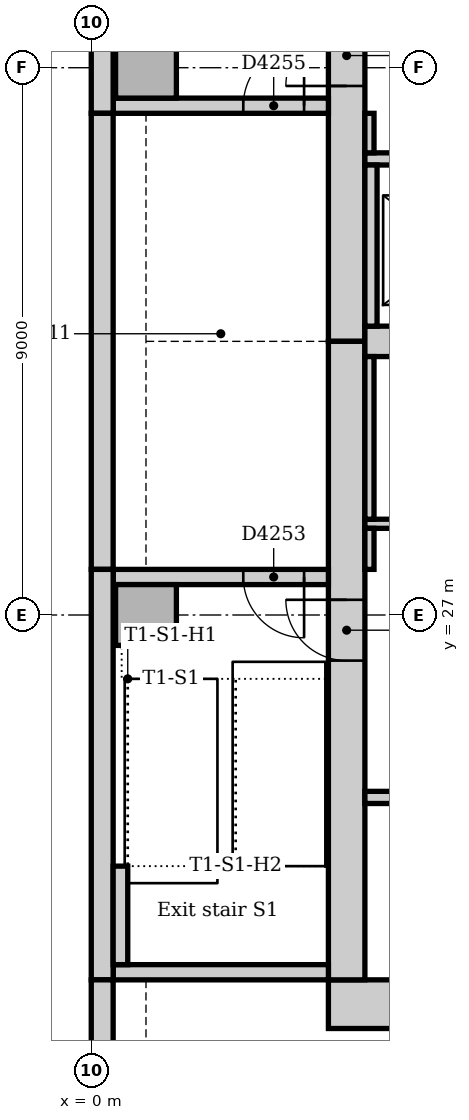
"""IFC4 building model, lengths in metres.
Left out: names, types, materials, properties, quantities, classifications, styles, units other than length and angle.
Written with IfcOpenShell. Run it as: python <this file> out.ifc"""

import sys

from ifc_helpers import new_model, si_unit, direction, frame, frame_2d, origin, origin_2d, place, context, subcontext, project, spatial, rectangle, extrude, element, fill, save


model = new_model("IFC4")
c1 = context("Model", 3, precision=1e-05, world=origin(), true_north=direction((0.0, 1.0)))
c2 = subcontext(c1, "Body", "Model", "MODEL_VIEW")
j1 = project(units=[si_unit("LENGTHUNIT", "METRE"), si_unit("PLANEANGLEUNIT", "RADIAN")], contexts=[c1])
p1 = place(None, origin())
s1 = spatial("IfcSite", under=j1, at=p1, CompositionType="ELEMENT")
p2 = place(p1, origin())
s2 = spatial("IfcBuilding", under=s1, at=p2, CompositionType="ELEMENT")
p3 = place(p2, frame((0.0, 0.0, 132.0)))
s3 = spatial("IfcBuildingStorey", under=s2, at=p3, CompositionType="ELEMENT", Elevation=132.0)
p4 = place(p3, frame((3.9, 20.6, 0.0), z_axis=(0.0, 0.0, 1.0), x_axis=(1.0, 0.0, 0.0)))
e1 = element("IfcWall", 1, at=p4, inside=s3, PredefinedType="SOLIDWALL", context=c2, shape_type="SweptSolid", body=[
    extrude(rectangle(XDim=19.4, YDim=0.8, at=frame_2d((9.7, 0.0))), origin(), (0.0, 0.0, 1.0), 4.0),
])
p5 = place(p3, frame((4.2, 42.0, 0.0), z_axis=(0.0, 0.0, 1.0), x_axis=(0.0, -1.0, 0.0)))
e2 = element("IfcWall", 2, at=p5, inside=s3, PredefinedType="SOLIDWALL", context=c2, shape_type="SweptSolid", body=[
    extrude(rectangle(XDim=10.5, YDim=0.6, at=frame_2d((5.25, 0.0))), origin(), (0.0, 0.0, 1.0), 4.0),
])
p6 = place(p5, frame((5.3, 0.0, 0.0)))
e3 = element("IfcOpeningElement", 3, at=p6, cuts=e2, PredefinedType="OPENING", context=c2, shape_type="SweptSolid", body=[
    extrude(rectangle(XDim=1.0, YDim=2.1, at=frame_2d((0.5, 1.05))), frame((0.0, 0.31, 0.0), z_axis=(0.0, -1.0, 0.0), x_axis=(1.0, 0.0, 0.0)), (0.0, 0.0, 1.0), 0.62),
])
p7 = place(p3, frame((4.2, 31.5, 0.0), z_axis=(0.0, 0.0, 1.0), x_axis=(0.0, -1.0, 0.0)))
e4 = element("IfcWall", 4, at=p7, inside=s3, PredefinedType="SOLIDWALL", context=c2, shape_type="SweptSolid", body=[
    extrude(rectangle(XDim=10.5, YDim=0.6, at=frame_2d((5.25, 0.0))), origin(), (0.0, 0.0, 1.0), 4.0),
])
p8 = place(p7, frame((4.25, 0.0, 0.0)))
e5 = element("IfcOpeningElement", 5, at=p8, cuts=e4, PredefinedType="OPENING", context=c2, shape_type="SweptSolid", body=[
    extrude(rectangle(XDim=1.0, YDim=2.1, at=frame_2d((0.5, 1.05))), frame((0.0, 0.31, 0.0), z_axis=(0.0, -1.0, 0.0), x_axis=(1.0, 0.0, 0.0)), (0.0, 0.0, 1.0), 0.62),
])
p9 = place(p3, frame((4.5, 31.5, 0.0), z_axis=(0.0, 0.0, 1.0), x_axis=(1.0, 0.0, 0.0)))
e6 = element("IfcWall", 6, at=p9, inside=s3, PredefinedType="SOLIDWALL", context=c2, shape_type="SweptSolid", body=[
    extrude(rectangle(XDim=18.0, YDim=0.5, at=frame_2d((9.0, 0.0))), origin(), (0.0, 0.0, 1.0), 4.0),
])
p10 = place(p3, frame((0.36, 21.125, 0.0), z_axis=(0.0, 0.0, 1.0), x_axis=(1.0, 0.0, 0.0)))
e7 = element("IfcWall", 7, at=p10, inside=s3, PredefinedType="SOLIDWALL", context=c2, shape_type="SweptSolid", body=[
    extrude(rectangle(XDim=3.54, YDim=0.25, at=frame_2d((1.77, 0.0))), origin(), (0.0, 0.0, 1.0), 4.0),
])
p11 = place(p3, frame((3.9, 27.625, 0.0), z_axis=(0.0, 0.0, 1.0), x_axis=(-1.0, 0.0, 0.0)))
e8 = element("IfcWall", 8, at=p11, inside=s3, PredefinedType="SOLIDWALL", context=c2, shape_type="SweptSolid", body=[
    extrude(rectangle(XDim=3.54, YDim=0.25, at=frame_2d((1.77, 0.0))), origin(), (0.0, 0.0, 1.0), 4.0),
])
p12 = place(p11, frame((0.4, 0.0, 0.0)))
e9 = element("IfcOpeningElement", 9, at=p12, cuts=e8, PredefinedType="OPENING", context=c2, shape_type="SweptSolid", body=[
    extrude(rectangle(XDim=1.0, YDim=2.1, at=frame_2d((0.5, 1.05))), frame((0.0, 0.135, 0.0), z_axis=(0.0, -1.0, 0.0), x_axis=(1.0, 0.0, 0.0)), (0.0, 0.0, 1.0), 0.27),
])
p13 = place(p3, frame((0.36, 35.375, 0.0), z_axis=(0.0, 0.0, 1.0), x_axis=(1.0, 0.0, 0.0)))
e10 = element("IfcWall", 10, at=p13, inside=s3, PredefinedType="SOLIDWALL", context=c2, shape_type="SweptSolid", body=[
    extrude(rectangle(XDim=3.54, YDim=0.25, at=frame_2d((1.77, 0.0))), origin(), (0.0, 0.0, 1.0), 4.0),
])
p14 = place(p13, frame((2.14, 0.0, 0.0)))
e11 = element("IfcOpeningElement", 11, at=p14, cuts=e10, PredefinedType="OPENING", context=c2, shape_type="SweptSolid", body=[
    extrude(rectangle(XDim=1.0, YDim=2.1, at=frame_2d((0.5, 1.05))), frame((0.0, 0.135, 0.0), z_axis=(0.0, -1.0, 0.0), x_axis=(1.0, 0.0, 0.0)), (0.0, 0.0, 1.0), 0.27),
])
for number, where, z_axis, x_axis in (
    (12, (0.9, 27.0, 0.0), (0.0, 0.0, 1.0), (1.0, 0.0, 0.0)),
    (13, (0.9, 36.0, 0.0), (0.0, 0.0, 1.0), (1.0, 0.0, 0.0)),
):
    element("IfcColumn", number, at=place(p3, frame(where, z_axis=z_axis, x_axis=x_axis)), inside=s3, PredefinedType="COLUMN", context=c2, shape_type="SweptSolid", body=[
        extrude(rectangle(XDim=1.0, YDim=1.0, at=origin_2d()), origin(), (0.0, 0.0, 1.0), 4.0),
    ])
p15 = place(p3, frame((0.18, 42.0, 0.0), z_axis=(0.0, 0.0, 1.0), x_axis=(0.0, -1.0, 0.0)))
e14 = element("IfcWall", 14, at=p15, inside=s3, PredefinedType="STANDARD", context=c2, shape_type="SweptSolid", body=[
    extrude(rectangle(XDim=6.75, YDim=0.36, at=frame_2d((3.375, 0.0))), origin(), (0.0, 0.0, 1.0), 3.85),
])
p16 = place(p3, frame((0.18, 35.25, 0.0), z_axis=(0.0, 0.0, 1.0), x_axis=(0.0, -1.0, 0.0)))
e15 = element("IfcWall", 15, at=p16, inside=s3, PredefinedType="STANDARD", context=c2, shape_type="SweptSolid", body=[
    extrude(rectangle(XDim=7.5, YDim=0.36, at=frame_2d((3.75, 0.0))), origin(), (0.0, 0.0, 1.0), 3.85),
])
p17 = place(p3, frame((0.18, 27.75, 0.0), z_axis=(0.0, 0.0, 1.0), x_axis=(0.0, -1.0, 0.0)))
e16 = element("IfcWall", 16, at=p17, inside=s3, PredefinedType="STANDARD", context=c2, shape_type="SweptSolid", body=[
    extrude(rectangle(XDim=6.75, YDim=0.36, at=frame_2d((3.375, 0.0))), origin(), (0.0, 0.0, 1.0), 3.85),
])
p18 = place(p3, frame((0.18, 21.0, 0.0), z_axis=(0.0, 0.0, 1.0), x_axis=(0.0, -1.0, 0.0)))
e17 = element("IfcWall", 17, at=p18, inside=s3, PredefinedType="STANDARD", context=c2, shape_type="SweptSolid", body=[
    extrude(rectangle(XDim=12.257, YDim=0.36, at=frame_2d((6.129, 0.0))), origin(), (0.0, 0.0, 1.0), 3.85),
])
p19 = place(p18, frame((1.35, 0.0, 0.9)))
e18 = element("IfcOpeningElement", 18, at=p19, cuts=e17, PredefinedType="OPENING", context=c2, shape_type="SweptSolid", body=[
    extrude(rectangle(XDim=3.3, YDim=1.6, at=frame_2d((1.65, 0.8))), frame((0.0, 0.19, 0.0), z_axis=(0.0, -1.0, 0.0), x_axis=(1.0, 0.0, 0.0)), (0.0, 0.0, 1.0), 0.38),
])
p20 = place(p18, frame((5.85, 0.0, 0.9)))
e19 = element("IfcOpeningElement", 19, at=p20, cuts=e17, PredefinedType="OPENING", context=c2, shape_type="SweptSolid", body=[
    extrude(rectangle(XDim=3.3, YDim=1.6, at=frame_2d((1.65, 0.8))), frame((0.0, 0.19, 0.0), z_axis=(0.0, -1.0, 0.0), x_axis=(1.0, 0.0, 0.0)), (0.0, 0.0, 1.0), 0.38),
])
p21 = place(p3, frame((0.48, 21.25, 0.0), z_axis=(0.0, 0.0, 1.0), x_axis=(0.0, 1.0, 0.0)))
e20 = element("IfcWall", 20, at=p21, inside=s3, PredefinedType="STANDARD", context=c2, shape_type="SweptSolid", body=[
    extrude(rectangle(XDim=1.62, YDim=0.24, at=frame_2d((0.81, 0.0))), origin(), (0.0, 0.0, 1.0), 4.0),
])
p22 = place(p3, frame((4.5, 24.0, 0.0), z_axis=(0.0, 0.0, 1.0), x_axis=(1.0, 0.0, 0.0)))
e21 = element("IfcWall", 21, at=p22, inside=s3, PredefinedType="PARTITIONING", context=c2, shape_type="SweptSolid", body=[
    extrude(rectangle(XDim=18.0, YDim=0.2, at=frame_2d((9.0, 0.0))), origin(), (0.0, 0.0, 1.0), 3.85),
])
p23 = place(p22, frame((0.95, 0.0, 0.0)))
e22 = element("IfcOpeningElement", 22, at=p23, cuts=e21, PredefinedType="OPENING", context=c2, shape_type="SweptSolid", body=[
    extrude(rectangle(XDim=1.1, YDim=2.1, at=frame_2d((0.55, 1.05))), frame((0.0, 0.11, 0.0), z_axis=(0.0, -1.0, 0.0), x_axis=(1.0, 0.0, 0.0)), (0.0, 0.0, 1.0), 0.22),
])
p24 = place(p22, frame((3.95, 0.0, 0.0)))
e23 = element("IfcOpeningElement", 23, at=p24, cuts=e21, PredefinedType="OPENING", context=c2, shape_type="SweptSolid", body=[
    extrude(rectangle(XDim=1.1, YDim=2.1, at=frame_2d((0.55, 1.05))), frame((0.0, 0.11, 0.0), z_axis=(0.0, -1.0, 0.0), x_axis=(1.0, 0.0, 0.0)), (0.0, 0.0, 1.0), 0.22),
])
p25 = place(p22, frame((6.95, 0.0, 0.0)))
e24 = element("IfcOpeningElement", 24, at=p25, cuts=e21, PredefinedType="OPENING", context=c2, shape_type="SweptSolid", body=[
    extrude(rectangle(XDim=1.1, YDim=2.1, at=frame_2d((0.55, 1.05))), frame((0.0, 0.11, 0.0), z_axis=(0.0, -1.0, 0.0), x_axis=(1.0, 0.0, 0.0)), (0.0, 0.0, 1.0), 0.22),
])
p26 = place(p22, frame((9.95, 0.0, 0.0)))
e25 = element("IfcOpeningElement", 25, at=p26, cuts=e21, PredefinedType="OPENING", context=c2, shape_type="SweptSolid", body=[
    extrude(rectangle(XDim=1.1, YDim=2.1, at=frame_2d((0.55, 1.05))), frame((0.0, 0.11, 0.0), z_axis=(0.0, -1.0, 0.0), x_axis=(1.0, 0.0, 0.0)), (0.0, 0.0, 1.0), 0.22),
])
p27 = place(p22, frame((12.95, 0.0, 0.0)))
e26 = element("IfcOpeningElement", 26, at=p27, cuts=e21, PredefinedType="OPENING", context=c2, shape_type="SweptSolid", body=[
    extrude(rectangle(XDim=1.1, YDim=2.1, at=frame_2d((0.55, 1.05))), frame((0.0, 0.11, 0.0), z_axis=(0.0, -1.0, 0.0), x_axis=(1.0, 0.0, 0.0)), (0.0, 0.0, 1.0), 0.22),
])
p28 = place(p22, frame((15.95, 0.0, 0.0)))
e27 = element("IfcOpeningElement", 27, at=p28, cuts=e21, PredefinedType="OPENING", context=c2, shape_type="SweptSolid", body=[
    extrude(rectangle(XDim=1.1, YDim=2.1, at=frame_2d((0.55, 1.05))), frame((0.0, 0.11, 0.0), z_axis=(0.0, -1.0, 0.0), x_axis=(1.0, 0.0, 0.0)), (0.0, 0.0, 1.0), 0.22),
])
p29 = place(p3, frame((4.5, 34.5, 0.0), z_axis=(0.0, 0.0, 1.0), x_axis=(1.0, 0.0, 0.0)))
e28 = element("IfcWall", 28, at=p29, inside=s3, PredefinedType="PARTITIONING", context=c2, shape_type="SweptSolid", body=[
    extrude(rectangle(XDim=18.0, YDim=0.2, at=frame_2d((9.0, 0.0))), origin(), (0.0, 0.0, 1.0), 3.85),
])
p30 = place(p29, frame((0.95, 0.0, 0.0)))
e29 = element("IfcOpeningElement", 29, at=p30, cuts=e28, PredefinedType="OPENING", context=c2, shape_type="SweptSolid", body=[
    extrude(rectangle(XDim=1.1, YDim=2.1, at=frame_2d((0.55, 1.05))), frame((0.0, 0.11, 0.0), z_axis=(0.0, -1.0, 0.0), x_axis=(1.0, 0.0, 0.0)), (0.0, 0.0, 1.0), 0.22),
])
p31 = place(p29, frame((3.95, 0.0, 0.0)))
e30 = element("IfcOpeningElement", 30, at=p31, cuts=e28, PredefinedType="OPENING", context=c2, shape_type="SweptSolid", body=[
    extrude(rectangle(XDim=1.1, YDim=2.1, at=frame_2d((0.55, 1.05))), frame((0.0, 0.11, 0.0), z_axis=(0.0, -1.0, 0.0), x_axis=(1.0, 0.0, 0.0)), (0.0, 0.0, 1.0), 0.22),
])
p32 = place(p29, frame((12.95, 0.0, 0.0)))
e31 = element("IfcOpeningElement", 31, at=p32, cuts=e28, PredefinedType="OPENING", context=c2, shape_type="SweptSolid", body=[
    extrude(rectangle(XDim=1.1, YDim=2.1, at=frame_2d((0.55, 1.05))), frame((0.0, 0.11, 0.0), z_axis=(0.0, -1.0, 0.0), x_axis=(1.0, 0.0, 0.0)), (0.0, 0.0, 1.0), 0.22),
])
p33 = place(p29, frame((15.95, 0.0, 0.0)))
e32 = element("IfcOpeningElement", 32, at=p33, cuts=e28, PredefinedType="OPENING", context=c2, shape_type="SweptSolid", body=[
    extrude(rectangle(XDim=1.1, YDim=2.1, at=frame_2d((0.55, 1.05))), frame((0.0, 0.11, 0.0), z_axis=(0.0, -1.0, 0.0), x_axis=(1.0, 0.0, 0.0)), (0.0, 0.0, 1.0), 0.22),
])
p34 = place(p3, frame((4.6, 31.75, 0.0), z_axis=(0.0, 0.0, 1.0), x_axis=(0.0, 1.0, 0.0)))
e33 = element("IfcWall", 33, at=p34, inside=s3, PredefinedType="PARTITIONING", context=c2, shape_type="SweptSolid", body=[
    extrude(rectangle(XDim=2.65, YDim=0.2, at=frame_2d((1.325, 0.0))), origin(), (0.0, 0.0, 1.0), 3.85),
])
p35 = place(p3, frame((4.5, 28.5, 0.0), z_axis=(0.0, 0.0, 1.0), x_axis=(1.0, 0.0, 0.0)))
e34 = element("IfcWall", 34, at=p35, inside=s3, PredefinedType="PARTITIONING", context=c2, shape_type="SweptSolid", body=[
    extrude(rectangle(XDim=18.0, YDim=0.15, at=frame_2d((9.0, 0.0))), origin(), (0.0, 0.0, 1.0), 3.85),
])
p36 = place(p35, frame((1.1, 0.0, 0.0)))
e35 = element("IfcOpeningElement", 35, at=p36, cuts=e34, PredefinedType="OPENING", context=c2, shape_type="SweptSolid", body=[
    extrude(rectangle(XDim=0.9, YDim=2.1, at=frame_2d((0.45, 1.05))), frame((0.0, 0.085, 0.0), z_axis=(0.0, -1.0, 0.0), x_axis=(1.0, 0.0, 0.0)), (0.0, 0.0, 1.0), 0.17),
])
p37 = place(p35, frame((5.55, 0.0, 0.0)))
e36 = element("IfcOpeningElement", 36, at=p37, cuts=e34, PredefinedType="OPENING", context=c2, shape_type="SweptSolid", body=[
    extrude(rectangle(XDim=0.9, YDim=2.1, at=frame_2d((0.45, 1.05))), frame((0.0, 0.085, 0.0), z_axis=(0.0, -1.0, 0.0), x_axis=(1.0, 0.0, 0.0)), (0.0, 0.0, 1.0), 0.17),
])
p38 = place(p35, frame((12.95, 0.0, 0.0)))
e37 = element("IfcOpeningElement", 37, at=p38, cuts=e34, PredefinedType="OPENING", context=c2, shape_type="SweptSolid", body=[
    extrude(rectangle(XDim=0.9, YDim=2.1, at=frame_2d((0.45, 1.05))), frame((0.0, 0.085, 0.0), z_axis=(0.0, -1.0, 0.0), x_axis=(1.0, 0.0, 0.0)), (0.0, 0.0, 1.0), 0.17),
])
p39 = place(p3, frame((4.575, 27.75, 0.0), z_axis=(0.0, 0.0, 1.0), x_axis=(0.0, 1.0, 0.0)))
e38 = element("IfcWall", 38, at=p39, inside=s3, PredefinedType="PARTITIONING", context=c2, shape_type="SweptSolid", body=[
    extrude(rectangle(XDim=0.675, YDim=0.15, at=frame_2d((0.338, 0.0))), origin(), (0.0, 0.0, 1.0), 3.85),
])
p40 = place(p3, frame((4.575, 28.575, 0.0), z_axis=(0.0, 0.0, 1.0), x_axis=(0.0, 1.0, 0.0)))
e39 = element("IfcWall", 39, at=p40, inside=s3, PredefinedType="PARTITIONING", context=c2, shape_type="SweptSolid", body=[
    extrude(rectangle(XDim=2.675, YDim=0.15, at=frame_2d((1.337, 0.0))), origin(), (0.0, 0.0, 1.0), 3.85),
])
p41 = place(p3, frame((4.575, 34.6, 0.0), z_axis=(0.0, 0.0, 1.0), x_axis=(0.0, 1.0, 0.0)))
e40 = element("IfcWall", 40, at=p41, inside=s3, PredefinedType="PARTITIONING", context=c2, shape_type="SweptSolid", body=[
    extrude(rectangle(XDim=0.65, YDim=0.15, at=frame_2d((0.325, 0.0))), origin(), (0.0, 0.0, 1.0), 3.85),
])
p42 = place(p8, frame((1.0, 0.0, 0.0), z_axis=(0.0, 0.0, 1.0), x_axis=(-1.0, 0.0, 0.0)))
e41 = element("IfcDoor", 41, at=p42, inside=s3, OperationType="SINGLE_SWING_RIGHT", PredefinedType="DOOR", context=c2, shape_type="SweptSolid", body=[
    extrude(rectangle(XDim=1.0, YDim=2.1, at=frame_2d((0.5, 1.05))), frame((0.0, 0.025, 0.0), z_axis=(0.0, -1.0, 0.0), x_axis=(1.0, 0.0, 0.0)), (0.0, 0.0, 1.0), 0.05),
])
fill(e5, e41)
p43 = place(p12, origin())
e42 = element("IfcDoor", 42, at=p43, inside=s3, OperationType="SINGLE_SWING_LEFT", PredefinedType="DOOR", context=c2, shape_type="SweptSolid", body=[
    extrude(rectangle(XDim=1.0, YDim=2.1, at=frame_2d((0.5, 1.05))), frame((0.0, 0.025, 0.0), z_axis=(0.0, -1.0, 0.0), x_axis=(1.0, 0.0, 0.0)), (0.0, 0.0, 1.0), 0.05),
])
fill(e9, e42)
p44 = place(p6, frame((1.0, 0.0, 0.0), z_axis=(0.0, 0.0, 1.0), x_axis=(-1.0, 0.0, 0.0)))
e43 = element("IfcDoor", 43, at=p44, inside=s3, OperationType="SINGLE_SWING_LEFT", PredefinedType="DOOR", context=c2, shape_type="SweptSolid", body=[
    extrude(rectangle(XDim=1.0, YDim=2.1, at=frame_2d((0.5, 1.05))), frame((0.0, 0.025, 0.0), z_axis=(0.0, -1.0, 0.0), x_axis=(1.0, 0.0, 0.0)), (0.0, 0.0, 1.0), 0.05),
])
fill(e3, e43)
p45 = place(p14, origin())
e44 = element("IfcDoor", 44, at=p45, inside=s3, OperationType="SINGLE_SWING_RIGHT", PredefinedType="DOOR", context=c2, shape_type="SweptSolid", body=[
    extrude(rectangle(XDim=1.0, YDim=2.1, at=frame_2d((0.5, 1.05))), frame((0.0, 0.025, 0.0), z_axis=(0.0, -1.0, 0.0), x_axis=(1.0, 0.0, 0.0)), (0.0, 0.0, 1.0), 0.05),
])
fill(e11, e44)
save(model, sys.argv[1])
